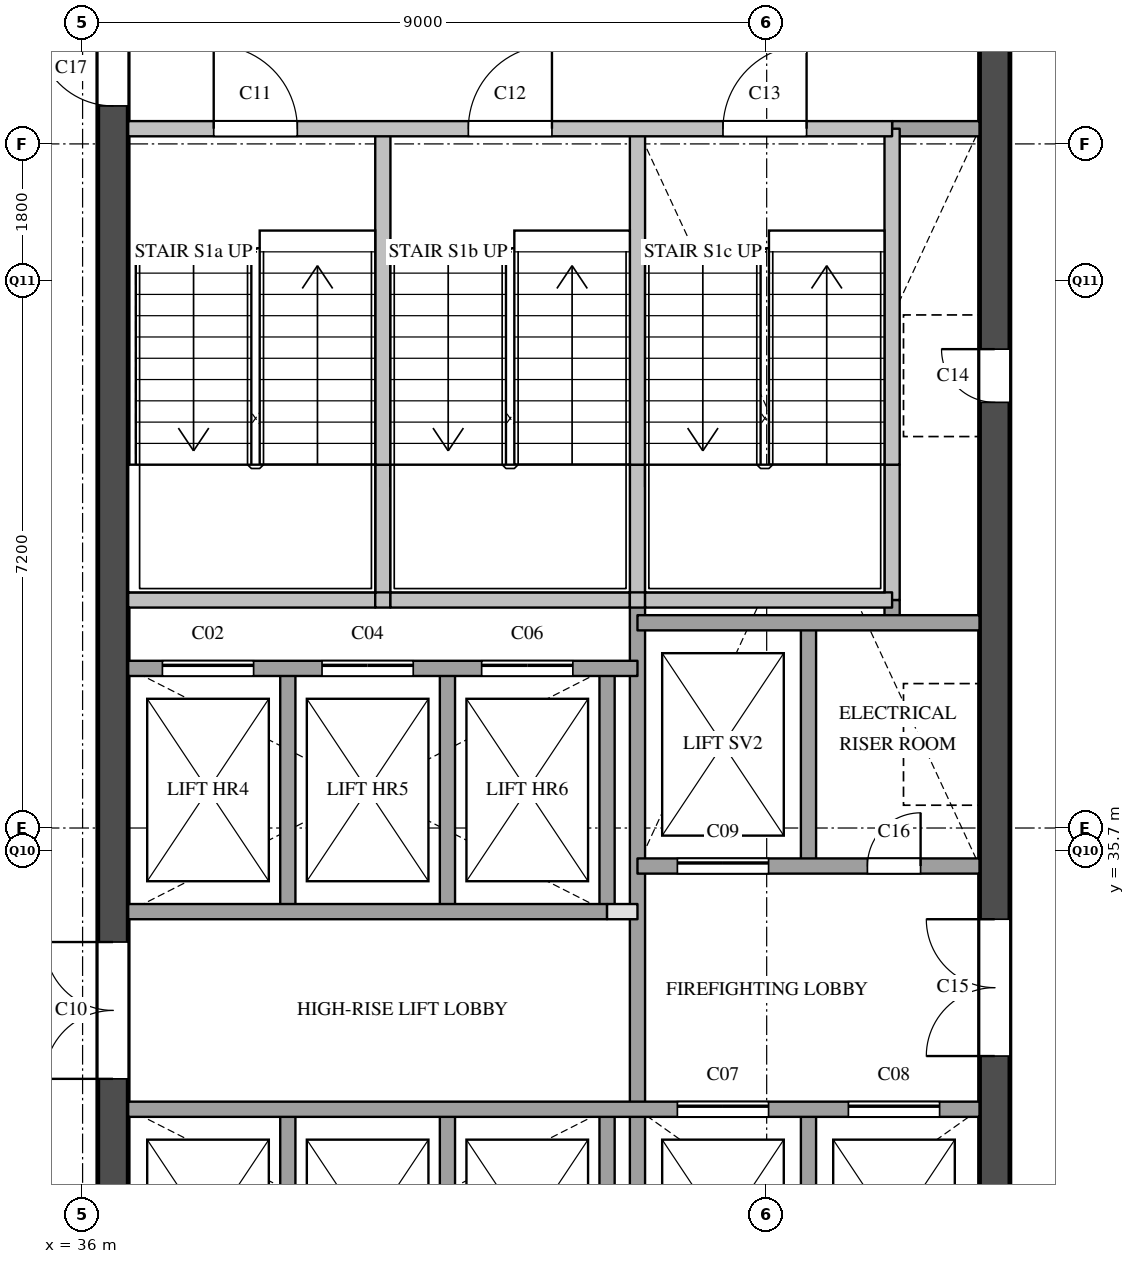
"""IFC4 building model, lengths in metres.
Left out: names, types, materials, properties, quantities, classifications, styles, units other than length and angle.
Written with IfcOpenShell. Run it as: python <this file> out.ifc"""

import sys

from ifc_helpers import new_model, si_unit, direction, frame, frame_2d, origin, place, context, subcontext, project, spatial, rectangle, extrude, element, fill, save


model = new_model("IFC4")
c1 = context("Model", 3, precision=1e-05, world=origin(), true_north=direction((0.0, 1.0)))
c2 = subcontext(c1, "Body", "Model", "MODEL_VIEW")
j1 = project(units=[si_unit("LENGTHUNIT", "METRE"), si_unit("PLANEANGLEUNIT", "RADIAN")], contexts=[c1])
p1 = place(None, origin())
s1 = spatial("IfcSite", under=j1, at=p1, CompositionType="ELEMENT")
p2 = place(p1, origin())
s2 = spatial("IfcBuilding", under=s1, at=p2, CompositionType="ELEMENT")
p3 = place(p2, frame((0.0, 0.0, 234.5)))
s3 = spatial("IfcBuildingStorey", under=s2, at=p3, CompositionType="ELEMENT", Elevation=234.5)
p4 = place(p3, frame((36.4, 29.1, 0.0), z_axis=(0.0, 0.0, 1.0), x_axis=(0.0, 1.0, 0.0)))
e1 = element("IfcWall", 1, at=p4, inside=s3, PredefinedType="SHEAR", context=c2, shape_type="SweptSolid", body=[
    extrude(rectangle(XDim=20.3, YDim=0.4, at=frame_2d((10.15, 0.0))), origin(), (0.0, 0.0, 1.0), 3.6),
])
p5 = place(p4, frame((3.6, 0.0, 0.0)))
e2 = element("IfcOpeningElement", 2, at=p5, cuts=e1, PredefinedType="OPENING", context=c2, shape_type="SweptSolid", body=[
    extrude(rectangle(XDim=1.8, YDim=2.1, at=frame_2d((0.9, 1.05))), frame((0.0, 0.21, 0.0), z_axis=(0.0, -1.0, 0.0), x_axis=(1.0, 0.0, 0.0)), (0.0, 0.0, 1.0), 0.42),
])
p6 = place(p4, frame((16.4, 0.0, 0.0)))
e3 = element("IfcOpeningElement", 3, at=p6, cuts=e1, PredefinedType="OPENING", context=c2, shape_type="SweptSolid", body=[
    extrude(rectangle(XDim=1.0, YDim=2.1, at=frame_2d((0.5, 1.05))), frame((0.0, 0.21, 0.0), z_axis=(0.0, -1.0, 0.0), x_axis=(1.0, 0.0, 0.0)), (0.0, 0.0, 1.0), 0.42),
])
p7 = place(p3, frame((48.0, 29.1, 0.0), z_axis=(0.0, 0.0, 1.0), x_axis=(0.0, 1.0, 0.0)))
e4 = element("IfcWall", 4, at=p7, inside=s3, PredefinedType="SHEAR", context=c2, shape_type="SweptSolid", body=[
    extrude(rectangle(XDim=20.3, YDim=0.4, at=frame_2d((10.15, 0.0))), origin(), (0.0, 0.0, 1.0), 3.6),
])
p8 = place(p7, frame((12.5, 0.0, 0.0)))
e5 = element("IfcOpeningElement", 5, at=p8, cuts=e4, PredefinedType="OPENING", context=c2, shape_type="SweptSolid", body=[
    extrude(rectangle(XDim=0.7, YDim=2.1, at=frame_2d((0.35, 1.05))), frame((0.0, 0.21, 0.0), z_axis=(0.0, -1.0, 0.0), x_axis=(1.0, 0.0, 0.0)), (0.0, 0.0, 1.0), 0.42),
])
p9 = place(p7, frame((3.9, 0.0, 0.0)))
e6 = element("IfcOpeningElement", 6, at=p9, cuts=e4, PredefinedType="OPENING", context=c2, shape_type="SweptSolid", body=[
    extrude(rectangle(XDim=1.8, YDim=2.1, at=frame_2d((0.9, 1.05))), frame((0.0, 0.21, 0.0), z_axis=(0.0, -1.0, 0.0), x_axis=(1.0, 0.0, 0.0)), (0.0, 0.0, 1.0), 0.42),
])
p10 = place(p3, frame((38.7, 29.1, 0.0), z_axis=(0.0, 0.0, 1.0), x_axis=(0.0, 1.0, 0.0)))
e7 = element("IfcWall", 7, at=p10, inside=s3, PredefinedType="SOLIDWALL", context=c2, shape_type="SweptSolid", body=[
    extrude(rectangle(XDim=3.2, YDim=0.2, at=frame_2d((1.6, 0.0))), origin(), (0.0, 0.0, 1.0), 3.6),
])
p11 = place(p3, frame((38.7, 34.9, 0.0), z_axis=(0.0, 0.0, 1.0), x_axis=(0.0, 1.0, 0.0)))
e8 = element("IfcWall", 8, at=p11, inside=s3, PredefinedType="SOLIDWALL", context=c2, shape_type="SweptSolid", body=[
    extrude(rectangle(XDim=3.2, YDim=0.2, at=frame_2d((1.6, 0.0))), origin(), (0.0, 0.0, 1.0), 3.6),
])
p12 = place(p3, frame((39.95, 39.0, 0.0), z_axis=(0.0, 0.0, 1.0), x_axis=(0.0, 1.0, 0.0)))
e9 = element("IfcWall", 9, at=p12, inside=s3, PredefinedType="SOLIDWALL", context=c2, shape_type="SweptSolid", body=[
    extrude(rectangle(XDim=1.78, YDim=0.2, at=frame_2d((0.89, 0.0))), origin(), (0.0, 0.0, 1.0), 3.6),
])
p13 = place(p3, frame((39.95, 40.78, 0.0), z_axis=(0.0, 0.0, 1.0), x_axis=(0.0, 1.0, 0.0)))
e10 = element("IfcWall", 10, at=p13, inside=s3, PredefinedType="SOLIDWALL", context=c2, shape_type="SweptSolid", body=[
    extrude(rectangle(XDim=4.42, YDim=0.2, at=frame_2d((2.21, 0.0))), origin(), (0.0, 0.0, 1.0), 3.6),
])
p14 = place(p3, frame((40.8, 29.1, 0.0), z_axis=(0.0, 0.0, 1.0), x_axis=(0.0, 1.0, 0.0)))
e11 = element("IfcWall", 11, at=p14, inside=s3, PredefinedType="SOLIDWALL", context=c2, shape_type="SweptSolid", body=[
    extrude(rectangle(XDim=3.2, YDim=0.2, at=frame_2d((1.6, 0.0))), origin(), (0.0, 0.0, 1.0), 3.6),
])
p15 = place(p3, frame((40.8, 34.9, 0.0), z_axis=(0.0, 0.0, 1.0), x_axis=(0.0, 1.0, 0.0)))
e12 = element("IfcWall", 12, at=p15, inside=s3, PredefinedType="SOLIDWALL", context=c2, shape_type="SweptSolid", body=[
    extrude(rectangle(XDim=3.2, YDim=0.2, at=frame_2d((1.6, 0.0))), origin(), (0.0, 0.0, 1.0), 3.6),
])
p16 = place(p3, frame((42.9, 29.1, 0.0), z_axis=(0.0, 0.0, 1.0), x_axis=(0.0, 1.0, 0.0)))
e13 = element("IfcWall", 13, at=p16, inside=s3, PredefinedType="SOLIDWALL", context=c2, shape_type="SweptSolid", body=[
    extrude(rectangle(XDim=3.2, YDim=0.2, at=frame_2d((1.6, 0.0))), origin(), (0.0, 0.0, 1.0), 3.6),
])
p17 = place(p3, frame((42.9, 34.9, 0.0), z_axis=(0.0, 0.0, 1.0), x_axis=(0.0, 1.0, 0.0)))
e14 = element("IfcWall", 14, at=p17, inside=s3, PredefinedType="SOLIDWALL", context=c2, shape_type="SweptSolid", body=[
    extrude(rectangle(XDim=3.2, YDim=0.2, at=frame_2d((1.6, 0.0))), origin(), (0.0, 0.0, 1.0), 3.6),
])
p18 = place(p3, frame((43.3, 29.1, 0.0), z_axis=(0.0, 0.0, 1.0), x_axis=(0.0, 1.0, 0.0)))
e15 = element("IfcWall", 15, at=p18, inside=s3, PredefinedType="SOLIDWALL", context=c2, shape_type="SweptSolid", body=[
    extrude(rectangle(XDim=9.9, YDim=0.2, at=frame_2d((4.95, 0.0))), origin(), (0.0, 0.0, 1.0), 3.6),
])
p19 = place(p3, frame((43.3, 39.0, 0.0), z_axis=(0.0, 0.0, 1.0), x_axis=(0.0, 1.0, 0.0)))
e16 = element("IfcWall", 16, at=p19, inside=s3, PredefinedType="SOLIDWALL", context=c2, shape_type="SweptSolid", body=[
    extrude(rectangle(XDim=1.78, YDim=0.2, at=frame_2d((0.89, 0.0))), origin(), (0.0, 0.0, 1.0), 3.6),
])
p20 = place(p3, frame((43.3, 40.78, 0.0), z_axis=(0.0, 0.0, 1.0), x_axis=(0.0, 1.0, 0.0)))
e17 = element("IfcWall", 17, at=p20, inside=s3, PredefinedType="SOLIDWALL", context=c2, shape_type="SweptSolid", body=[
    extrude(rectangle(XDim=4.42, YDim=0.2, at=frame_2d((2.21, 0.0))), origin(), (0.0, 0.0, 1.0), 3.6),
])
for number, where, z_axis, x_axis in (
    (18, (45.55, 29.1, 0.0), (0.0, 0.0, 1.0), (0.0, 1.0, 0.0)),
    (19, (45.55, 35.5, 0.0), (0.0, 0.0, 1.0), (0.0, 1.0, 0.0)),
):
    element("IfcWall", number, at=place(p3, frame(where, z_axis=z_axis, x_axis=x_axis)), inside=s3, PredefinedType="SOLIDWALL", context=c2, shape_type="SweptSolid", body=[
        extrude(rectangle(XDim=3.2, YDim=0.2, at=frame_2d((1.6, 0.0))), origin(), (0.0, 0.0, 1.0), 3.6),
    ])
p21 = place(p3, frame((46.65, 38.7, 0.0), z_axis=(0.0, 0.0, 1.0), x_axis=(0.0, 1.0, 0.0)))
e20 = element("IfcWall", 20, at=p21, inside=s3, PredefinedType="SOLIDWALL", context=c2, shape_type="SweptSolid", body=[
    extrude(rectangle(XDim=0.3, YDim=0.2, at=frame_2d((0.15, 0.0))), origin(), (0.0, 0.0, 1.0), 3.6),
])
p22 = place(p3, frame((46.65, 39.0, 0.0), z_axis=(0.0, 0.0, 1.0), x_axis=(0.0, 1.0, 0.0)))
e21 = element("IfcWall", 21, at=p22, inside=s3, PredefinedType="SOLIDWALL", context=c2, shape_type="SweptSolid", body=[
    extrude(rectangle(XDim=1.78, YDim=0.2, at=frame_2d((0.89, 0.0))), origin(), (0.0, 0.0, 1.0), 3.6),
])
p23 = place(p3, frame((46.65, 40.78, 0.0), z_axis=(0.0, 0.0, 1.0), x_axis=(0.0, 1.0, 0.0)))
e22 = element("IfcWall", 22, at=p23, inside=s3, PredefinedType="SOLIDWALL", context=c2, shape_type="SweptSolid", body=[
    extrude(rectangle(XDim=4.42, YDim=0.2, at=frame_2d((2.21, 0.0))), origin(), (0.0, 0.0, 1.0), 3.6),
])
p24 = place(p3, frame((36.6, 32.3, 0.0), z_axis=(0.0, 0.0, 1.0), x_axis=(1.0, 0.0, 0.0)))
e23 = element("IfcWall", 23, at=p24, inside=s3, PredefinedType="SOLIDWALL", context=c2, shape_type="SweptSolid", body=[
    extrude(rectangle(XDim=11.2, YDim=0.2, at=frame_2d((5.6, 0.0))), origin(), (0.0, 0.0, 1.0), 3.6),
])
p25 = place(p24, frame((7.225, 0.0, 0.0)))
e24 = element("IfcOpeningElement", 24, at=p25, cuts=e23, PredefinedType="OPENING", context=c2, shape_type="SweptSolid", body=[
    extrude(rectangle(XDim=1.2, YDim=2.1, at=frame_2d((0.6, 1.05))), frame((0.0, 0.11, 0.0), z_axis=(0.0, -1.0, 0.0), x_axis=(1.0, 0.0, 0.0)), (0.0, 0.0, 1.0), 0.22),
])
p26 = place(p24, frame((9.475, 0.0, 0.0)))
e25 = element("IfcOpeningElement", 25, at=p26, cuts=e23, PredefinedType="OPENING", context=c2, shape_type="SweptSolid", body=[
    extrude(rectangle(XDim=1.2, YDim=2.1, at=frame_2d((0.6, 1.05))), frame((0.0, 0.11, 0.0), z_axis=(0.0, -1.0, 0.0), x_axis=(1.0, 0.0, 0.0)), (0.0, 0.0, 1.0), 0.22),
])
p27 = place(p3, frame((42.9, 34.9, 0.0), z_axis=(0.0, 0.0, 1.0), x_axis=(1.0, 0.0, 0.0)))
e26 = element("IfcWall", 26, at=p27, inside=s3, PredefinedType="PARTITIONING", context=c2, shape_type="SweptSolid", body=[
    extrude(rectangle(XDim=0.4, YDim=0.2, at=frame_2d((0.2, 0.0))), origin(), (0.0, 0.0, 1.0), 3.6),
])
p28 = place(p3, frame((36.6, 34.9, 0.0), z_axis=(0.0, 0.0, 1.0), x_axis=(1.0, 0.0, 0.0)))
e27 = element("IfcWall", 27, at=p28, inside=s3, PredefinedType="SOLIDWALL", context=c2, shape_type="SweptSolid", body=[
    extrude(rectangle(XDim=6.3, YDim=0.2, at=frame_2d((3.15, 0.0))), origin(), (0.0, 0.0, 1.0), 3.6),
])
p29 = place(p3, frame((43.3, 35.5, 0.0), z_axis=(0.0, 0.0, 1.0), x_axis=(1.0, 0.0, 0.0)))
e28 = element("IfcWall", 28, at=p29, inside=s3, PredefinedType="SOLIDWALL", context=c2, shape_type="SweptSolid", body=[
    extrude(rectangle(XDim=4.5, YDim=0.2, at=frame_2d((2.25, 0.0))), origin(), (0.0, 0.0, 1.0), 3.6),
])
p30 = place(p29, frame((0.525, 0.0, 0.0)))
e29 = element("IfcOpeningElement", 29, at=p30, cuts=e28, PredefinedType="OPENING", context=c2, shape_type="SweptSolid", body=[
    extrude(rectangle(XDim=1.2, YDim=2.1, at=frame_2d((0.6, 1.05))), frame((0.0, 0.11, 0.0), z_axis=(0.0, -1.0, 0.0), x_axis=(1.0, 0.0, 0.0)), (0.0, 0.0, 1.0), 0.22),
])
p31 = place(p29, frame((3.025, 0.0, 0.0)))
e30 = element("IfcOpeningElement", 30, at=p31, cuts=e28, PredefinedType="OPENING", context=c2, shape_type="SweptSolid", body=[
    extrude(rectangle(XDim=0.7, YDim=2.1, at=frame_2d((0.35, 1.05))), frame((0.0, 0.11, 0.0), z_axis=(0.0, -1.0, 0.0), x_axis=(1.0, 0.0, 0.0)), (0.0, 0.0, 1.0), 0.22),
])
p32 = place(p3, frame((36.6, 38.1, 0.0), z_axis=(0.0, 0.0, 1.0), x_axis=(1.0, 0.0, 0.0)))
e31 = element("IfcWall", 31, at=p32, inside=s3, PredefinedType="SOLIDWALL", context=c2, shape_type="SweptSolid", body=[
    extrude(rectangle(XDim=6.7, YDim=0.2, at=frame_2d((3.35, 0.0))), origin(), (0.0, 0.0, 1.0), 3.6),
])
p33 = place(p32, frame((0.45, 0.0, 0.0)))
e32 = element("IfcOpeningElement", 32, at=p33, cuts=e31, PredefinedType="OPENING", context=c2, shape_type="SweptSolid", body=[
    extrude(rectangle(XDim=1.2, YDim=2.1, at=frame_2d((0.6, 1.05))), frame((0.0, 0.11, 0.0), z_axis=(0.0, -1.0, 0.0), x_axis=(1.0, 0.0, 0.0)), (0.0, 0.0, 1.0), 0.22),
])
p34 = place(p32, frame((2.55, 0.0, 0.0)))
e33 = element("IfcOpeningElement", 33, at=p34, cuts=e31, PredefinedType="OPENING", context=c2, shape_type="SweptSolid", body=[
    extrude(rectangle(XDim=1.2, YDim=2.1, at=frame_2d((0.6, 1.05))), frame((0.0, 0.11, 0.0), z_axis=(0.0, -1.0, 0.0), x_axis=(1.0, 0.0, 0.0)), (0.0, 0.0, 1.0), 0.22),
])
p35 = place(p32, frame((4.65, 0.0, 0.0)))
e34 = element("IfcOpeningElement", 34, at=p35, cuts=e31, PredefinedType="OPENING", context=c2, shape_type="SweptSolid", body=[
    extrude(rectangle(XDim=1.2, YDim=2.1, at=frame_2d((0.6, 1.05))), frame((0.0, 0.11, 0.0), z_axis=(0.0, -1.0, 0.0), x_axis=(1.0, 0.0, 0.0)), (0.0, 0.0, 1.0), 0.22),
])
p36 = place(p3, frame((43.3, 38.7, 0.0), z_axis=(0.0, 0.0, 1.0), x_axis=(1.0, 0.0, 0.0)))
e35 = element("IfcWall", 35, at=p36, inside=s3, PredefinedType="SOLIDWALL", context=c2, shape_type="SweptSolid", body=[
    extrude(rectangle(XDim=4.5, YDim=0.2, at=frame_2d((2.25, 0.0))), origin(), (0.0, 0.0, 1.0), 3.6),
])
p37 = place(p3, frame((36.6, 39.0, 0.0), z_axis=(0.0, 0.0, 1.0), x_axis=(1.0, 0.0, 0.0)))
e36 = element("IfcWall", 36, at=p37, inside=s3, PredefinedType="SOLIDWALL", context=c2, shape_type="SweptSolid", body=[
    extrude(rectangle(XDim=3.25, YDim=0.2, at=frame_2d((1.625, 0.0))), origin(), (0.0, 0.0, 1.0), 3.6),
])
p38 = place(p3, frame((39.85, 39.0, 0.0), z_axis=(0.0, 0.0, 1.0), x_axis=(1.0, 0.0, 0.0)))
e37 = element("IfcWall", 37, at=p38, inside=s3, PredefinedType="SOLIDWALL", context=c2, shape_type="SweptSolid", body=[
    extrude(rectangle(XDim=0.2, YDim=0.2, at=frame_2d((0.1, 0.0))), origin(), (0.0, 0.0, 1.0), 3.6),
])
p39 = place(p3, frame((40.05, 39.0, 0.0), z_axis=(0.0, 0.0, 1.0), x_axis=(1.0, 0.0, 0.0)))
e38 = element("IfcWall", 38, at=p39, inside=s3, PredefinedType="SOLIDWALL", context=c2, shape_type="SweptSolid", body=[
    extrude(rectangle(XDim=3.15, YDim=0.2, at=frame_2d((1.575, 0.0))), origin(), (0.0, 0.0, 1.0), 3.6),
])
p40 = place(p3, frame((43.2, 39.0, 0.0), z_axis=(0.0, 0.0, 1.0), x_axis=(1.0, 0.0, 0.0)))
e39 = element("IfcWall", 39, at=p40, inside=s3, PredefinedType="SOLIDWALL", context=c2, shape_type="SweptSolid", body=[
    extrude(rectangle(XDim=0.2, YDim=0.2, at=frame_2d((0.1, 0.0))), origin(), (0.0, 0.0, 1.0), 3.6),
])
p41 = place(p3, frame((43.4, 39.0, 0.0), z_axis=(0.0, 0.0, 1.0), x_axis=(1.0, 0.0, 0.0)))
e40 = element("IfcWall", 40, at=p41, inside=s3, PredefinedType="SOLIDWALL", context=c2, shape_type="SweptSolid", body=[
    extrude(rectangle(XDim=3.25, YDim=0.2, at=frame_2d((1.625, 0.0))), origin(), (0.0, 0.0, 1.0), 3.6),
])
p42 = place(p3, frame((46.65, 45.2, 0.0), z_axis=(0.0, 0.0, 1.0), x_axis=(1.0, 0.0, 0.0)))
e41 = element("IfcWall", 41, at=p42, inside=s3, PredefinedType="SOLIDWALL", context=c2, shape_type="SweptSolid", body=[
    extrude(rectangle(XDim=1.15, YDim=0.2, at=frame_2d((0.575, 0.0))), origin(), (0.0, 0.0, 1.0), 3.6),
])
p43 = place(p3, frame((36.6, 45.2, 0.0), z_axis=(0.0, 0.0, 1.0), x_axis=(1.0, 0.0, 0.0)))
e42 = element("IfcWall", 42, at=p43, inside=s3, PredefinedType="SOLIDWALL", context=c2, shape_type="SweptSolid", body=[
    extrude(rectangle(XDim=10.05, YDim=0.2, at=frame_2d((5.025, 0.0))), origin(), (0.0, 0.0, 1.0), 3.6),
])
p44 = place(p43, frame((1.125, 0.0, 0.0)))
e43 = element("IfcOpeningElement", 43, at=p44, cuts=e42, PredefinedType="OPENING", context=c2, shape_type="SweptSolid", body=[
    extrude(rectangle(XDim=1.1, YDim=2.1, at=frame_2d((0.55, 1.05))), frame((0.0, 0.11, 0.0), z_axis=(0.0, -1.0, 0.0), x_axis=(1.0, 0.0, 0.0)), (0.0, 0.0, 1.0), 0.22),
])
p45 = place(p43, frame((4.475, 0.0, 0.0)))
e44 = element("IfcOpeningElement", 44, at=p45, cuts=e42, PredefinedType="OPENING", context=c2, shape_type="SweptSolid", body=[
    extrude(rectangle(XDim=1.1, YDim=2.1, at=frame_2d((0.55, 1.05))), frame((0.0, 0.11, 0.0), z_axis=(0.0, -1.0, 0.0), x_axis=(1.0, 0.0, 0.0)), (0.0, 0.0, 1.0), 0.22),
])
p46 = place(p43, frame((7.825, 0.0, 0.0)))
e45 = element("IfcOpeningElement", 45, at=p46, cuts=e42, PredefinedType="OPENING", context=c2, shape_type="SweptSolid", body=[
    extrude(rectangle(XDim=1.1, YDim=2.1, at=frame_2d((0.55, 1.05))), frame((0.0, 0.11, 0.0), z_axis=(0.0, -1.0, 0.0), x_axis=(1.0, 0.0, 0.0)), (0.0, 0.0, 1.0), 0.22),
])
p47 = place(p33, origin())
e46 = element("IfcDoor", 46, at=p47, inside=s3, OperationType="SLIDING_TO_LEFT", PredefinedType="DOOR", context=c2, shape_type="SweptSolid", body=[
    extrude(rectangle(XDim=1.2, YDim=2.1, at=frame_2d((0.6, 1.05))), frame((0.0, 0.025, 0.0), z_axis=(0.0, -1.0, 0.0), x_axis=(1.0, 0.0, 0.0)), (0.0, 0.0, 1.0), 0.05),
])
fill(e32, e46)
p48 = place(p34, origin())
e47 = element("IfcDoor", 47, at=p48, inside=s3, OperationType="SLIDING_TO_LEFT", PredefinedType="DOOR", context=c2, shape_type="SweptSolid", body=[
    extrude(rectangle(XDim=1.2, YDim=2.1, at=frame_2d((0.6, 1.05))), frame((0.0, 0.025, 0.0), z_axis=(0.0, -1.0, 0.0), x_axis=(1.0, 0.0, 0.0)), (0.0, 0.0, 1.0), 0.05),
])
fill(e33, e47)
p49 = place(p35, origin())
e48 = element("IfcDoor", 48, at=p49, inside=s3, OperationType="SLIDING_TO_LEFT", PredefinedType="DOOR", context=c2, shape_type="SweptSolid", body=[
    extrude(rectangle(XDim=1.2, YDim=2.1, at=frame_2d((0.6, 1.05))), frame((0.0, 0.025, 0.0), z_axis=(0.0, -1.0, 0.0), x_axis=(1.0, 0.0, 0.0)), (0.0, 0.0, 1.0), 0.05),
])
fill(e34, e48)
p50 = place(p25, origin())
e49 = element("IfcDoor", 49, at=p50, inside=s3, OperationType="SLIDING_TO_LEFT", PredefinedType="DOOR", context=c2, shape_type="SweptSolid", body=[
    extrude(rectangle(XDim=1.2, YDim=2.1, at=frame_2d((0.6, 1.05))), frame((0.0, 0.025, 0.0), z_axis=(0.0, -1.0, 0.0), x_axis=(1.0, 0.0, 0.0)), (0.0, 0.0, 1.0), 0.05),
])
fill(e24, e49)
p51 = place(p26, origin())
e50 = element("IfcDoor", 50, at=p51, inside=s3, OperationType="SLIDING_TO_LEFT", PredefinedType="DOOR", context=c2, shape_type="SweptSolid", body=[
    extrude(rectangle(XDim=1.2, YDim=2.1, at=frame_2d((0.6, 1.05))), frame((0.0, 0.025, 0.0), z_axis=(0.0, -1.0, 0.0), x_axis=(1.0, 0.0, 0.0)), (0.0, 0.0, 1.0), 0.05),
])
fill(e25, e50)
p52 = place(p30, origin())
e51 = element("IfcDoor", 51, at=p52, inside=s3, OperationType="SLIDING_TO_LEFT", PredefinedType="DOOR", context=c2, shape_type="SweptSolid", body=[
    extrude(rectangle(XDim=1.2, YDim=2.1, at=frame_2d((0.6, 1.05))), frame((0.0, 0.025, 0.0), z_axis=(0.0, -1.0, 0.0), x_axis=(1.0, 0.0, 0.0)), (0.0, 0.0, 1.0), 0.05),
])
fill(e29, e51)
p53 = place(p5, origin())
e52 = element("IfcDoor", 52, at=p53, inside=s3, OperationType="DOUBLE_DOOR_SINGLE_SWING", PredefinedType="DOOR", context=c2, shape_type="SweptSolid", body=[
    extrude(rectangle(XDim=1.8, YDim=2.1, at=frame_2d((0.9, 1.05))), frame((0.0, 0.025, 0.0), z_axis=(0.0, -1.0, 0.0), x_axis=(1.0, 0.0, 0.0)), (0.0, 0.0, 1.0), 0.05),
])
fill(e2, e52)
p54 = place(p44, origin())
e53 = element("IfcDoor", 53, at=p54, inside=s3, OperationType="SINGLE_SWING_LEFT", PredefinedType="DOOR", context=c2, shape_type="SweptSolid", body=[
    extrude(rectangle(XDim=1.1, YDim=2.1, at=frame_2d((0.55, 1.05))), frame((0.0, 0.025, 0.0), z_axis=(0.0, -1.0, 0.0), x_axis=(1.0, 0.0, 0.0)), (0.0, 0.0, 1.0), 0.05),
])
fill(e43, e53)
p55 = place(p45, origin())
e54 = element("IfcDoor", 54, at=p55, inside=s3, OperationType="SINGLE_SWING_RIGHT", PredefinedType="DOOR", context=c2, shape_type="SweptSolid", body=[
    extrude(rectangle(XDim=1.1, YDim=2.1, at=frame_2d((0.55, 1.05))), frame((0.0, 0.025, 0.0), z_axis=(0.0, -1.0, 0.0), x_axis=(1.0, 0.0, 0.0)), (0.0, 0.0, 1.0), 0.05),
])
fill(e44, e54)
p56 = place(p46, origin())
e55 = element("IfcDoor", 55, at=p56, inside=s3, OperationType="SINGLE_SWING_RIGHT", PredefinedType="DOOR", context=c2, shape_type="SweptSolid", body=[
    extrude(rectangle(XDim=1.1, YDim=2.1, at=frame_2d((0.55, 1.05))), frame((0.0, 0.025, 0.0), z_axis=(0.0, -1.0, 0.0), x_axis=(1.0, 0.0, 0.0)), (0.0, 0.0, 1.0), 0.05),
])
fill(e45, e55)
p57 = place(p8, origin())
e56 = element("IfcDoor", 56, at=p57, inside=s3, OperationType="SINGLE_SWING_RIGHT", PredefinedType="DOOR", context=c2, shape_type="SweptSolid", body=[
    extrude(rectangle(XDim=0.7, YDim=2.1, at=frame_2d((0.35, 1.05))), frame((0.0, 0.025, 0.0), z_axis=(0.0, -1.0, 0.0), x_axis=(1.0, 0.0, 0.0)), (0.0, 0.0, 1.0), 0.05),
])
fill(e5, e56)
p58 = place(p9, origin())
e57 = element("IfcDoor", 57, at=p58, inside=s3, OperationType="DOUBLE_DOOR_SINGLE_SWING", PredefinedType="DOOR", context=c2, shape_type="SweptSolid", body=[
    extrude(rectangle(XDim=1.8, YDim=2.1, at=frame_2d((0.9, 1.05))), frame((0.0, 0.025, 0.0), z_axis=(0.0, -1.0, 0.0), x_axis=(1.0, 0.0, 0.0)), (0.0, 0.0, 1.0), 0.05),
])
fill(e6, e57)
p59 = place(p31, origin())
e58 = element("IfcDoor", 58, at=p59, inside=s3, OperationType="SINGLE_SWING_RIGHT", PredefinedType="DOOR", context=c2, shape_type="SweptSolid", body=[
    extrude(rectangle(XDim=0.7, YDim=2.1, at=frame_2d((0.35, 1.05))), frame((0.0, 0.025, 0.0), z_axis=(0.0, -1.0, 0.0), x_axis=(1.0, 0.0, 0.0)), (0.0, 0.0, 1.0), 0.05),
])
fill(e30, e58)
p60 = place(p6, origin())
e59 = element("IfcDoor", 59, at=p60, inside=s3, OperationType="SINGLE_SWING_RIGHT", PredefinedType="DOOR", context=c2, shape_type="SweptSolid", body=[
    extrude(rectangle(XDim=1.0, YDim=2.1, at=frame_2d((0.5, 1.05))), frame((0.0, 0.025, 0.0), z_axis=(0.0, -1.0, 0.0), x_axis=(1.0, 0.0, 0.0)), (0.0, 0.0, 1.0), 0.05),
])
fill(e3, e59)
save(model, sys.argv[1])
